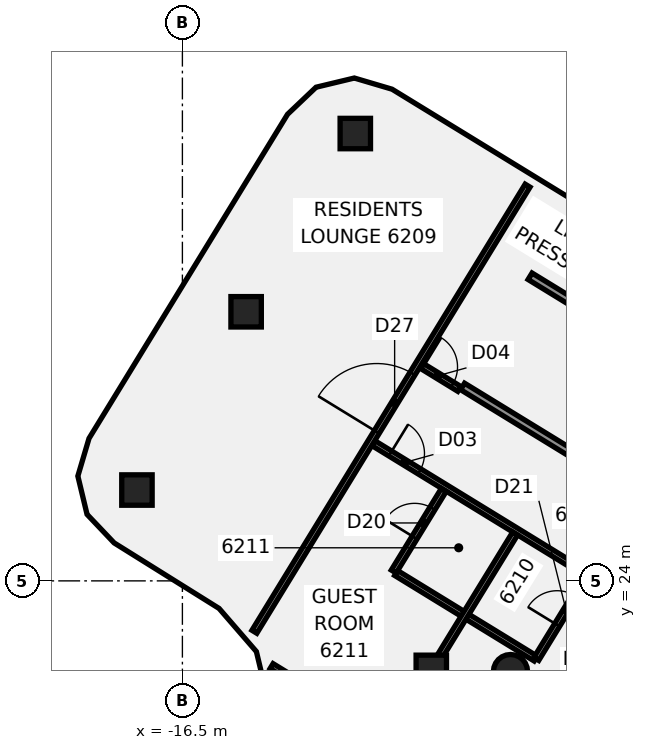
"""IFC4 building model, lengths in metres.
Left out: names, types, materials, properties, quantities, classifications, styles, units other than length and angle.
Written with IfcOpenShell. Run it as: python <this file> out.ifc"""

import sys

from ifc_helpers import new_model, si_unit, direction, frame, frame_2d, origin, origin_2d, place, context, subcontext, project, spatial, polyline, rectangle, circle, outline, extrude, element, fill, save


model = new_model("IFC4")
c1 = context("Model", 3, precision=1e-05, world=origin(), true_north=direction((0.0, 1.0)))
c2 = subcontext(c1, "Body", "Model", "MODEL_VIEW")
j1 = project(units=[si_unit("LENGTHUNIT", "METRE"), si_unit("PLANEANGLEUNIT", "RADIAN")], contexts=[c1])
p1 = place(None, origin())
s1 = spatial("IfcSite", under=j1, at=p1, CompositionType="ELEMENT")
p2 = place(p1, origin())
s2 = spatial("IfcBuilding", under=s1, at=p2, CompositionType="ELEMENT")
p3 = place(p2, frame((0.0, 0.0, 245.1)))
s3 = spatial("IfcBuildingStorey", under=s2, at=p3, CompositionType="ELEMENT", Elevation=245.1)
p4 = place(p3, frame((-7.866, 21.613, -0.14), z_axis=(0.0, 0.0, 1.0), x_axis=(1.0, 0.0, 0.0)))
e1 = element("IfcColumn", 1, at=p4, inside=s3, PredefinedType="COLUMN", context=c2, shape_type="SweptSolid", body=[
    extrude(circle(Radius=0.45, at=origin_2d()), origin(), (0.0, 0.0, 1.0), 3.6),
])
p5 = place(p3, frame((-9.951, 21.646, -0.139), z_axis=(0.002304349187, -0.050289032263, 0.998732047753), x_axis=(0.521494023038, 0.852234898638, 0.041709249322)))
e2 = element("IfcColumn", 2, at=p5, inside=s3, PredefinedType="COLUMN", context=c2, shape_type="SweptSolid", body=[
    extrude(rectangle(XDim=0.8, YDim=0.8, at=origin_2d()), origin(), (0.0, 0.0, 1.0), 3.602),
])
p6 = place(p3, frame((-11.95, 35.77, -0.138), z_axis=(0.016732272365, -0.110986242097, 0.993681078177), x_axis=(0.522723880647, 0.84816015737, 0.085930739847)))
e3 = element("IfcColumn", 3, at=p6, inside=s3, PredefinedType="COLUMN", context=c2, shape_type="SweptSolid", body=[
    extrude(rectangle(XDim=0.8, YDim=0.8, at=origin_2d()), origin(), (0.0, 0.0, 1.0), 3.619),
])
p7 = place(p3, frame((-14.823, 31.08, -0.138), z_axis=(0.040318536975, -0.124994195598, 0.991337917485), x_axis=(0.524239786141, 0.84726684636, 0.085507529997)))
e4 = element("IfcColumn", 4, at=p7, inside=s3, PredefinedType="COLUMN", context=c2, shape_type="SweptSolid", body=[
    extrude(rectangle(XDim=0.8, YDim=0.8, at=origin_2d()), origin(), (0.0, 0.0, 1.0), 3.627),
])
p8 = place(p3, frame((-17.696, 26.39, -0.138), z_axis=(0.063818113433, -0.138708770206, 0.988274822843), x_axis=(0.525000356657, 0.846851158374, 0.084957289684)))
e5 = element("IfcColumn", 5, at=p8, inside=s3, PredefinedType="COLUMN", context=c2, shape_type="SweptSolid", body=[
    extrude(rectangle(XDim=0.8, YDim=0.8, at=origin_2d()), origin(), (0.0, 0.0, 1.0), 3.638),
])
p9 = place(p3, frame((-14.153, 21.758, 0.0), z_axis=(0.0, 0.0, 1.0), x_axis=(0.852608746258, -0.522549830929, 0.0)))
e6 = element("IfcWall", 6, at=p9, inside=s3, PredefinedType="PARTITIONING", context=c2, shape_type="SweptSolid", body=[
    extrude(rectangle(XDim=2.809, YDim=0.15, at=frame_2d((1.405, 0.0))), origin(), (0.0, 0.0, 1.0), 2.864),
])
p10 = place(p3, frame((-10.875, 24.206, 0.0), z_axis=(0.0, 0.0, 1.0), x_axis=(0.852560498392, -0.522628545509, 0.0)))
e7 = element("IfcWall", 7, at=p10, inside=s3, PredefinedType="PARTITIONING", context=c2, shape_type="SweptSolid", body=[
    extrude(rectangle(XDim=4.305, YDim=0.15, at=frame_2d((2.153, 0.0))), origin(), (0.0, 0.0, 1.0), 2.864),
])
p11 = place(p3, frame((-11.473, 27.622, 0.0), z_axis=(0.0, 0.0, 1.0), x_axis=(0.852562421737, -0.522625407957, 0.0)))
e8 = element("IfcWall", 8, at=p11, inside=s3, PredefinedType="PARTITIONING", context=c2, shape_type="SweptSolid", body=[
    extrude(rectangle(XDim=8.675, YDim=0.15, at=frame_2d((4.338, 0.0))), origin(), (0.0, 0.0, 1.0), 2.864),
])
p12 = place(p11, frame((6.921, 0.0, 0.0)))
e9 = element("IfcOpeningElement", 9, at=p12, cuts=e8, PredefinedType="OPENING", context=c2, shape_type="SweptSolid", body=[
    extrude(rectangle(XDim=0.9, YDim=2.1, at=frame_2d((0.45, 1.05))), frame((0.0, 0.085, 0.0), z_axis=(0.0, -1.0, 0.0), x_axis=(1.0, 0.0, 0.0)), (0.0, 0.0, 1.0), 0.17),
])
p13 = place(p11, frame((0.52, 0.0, 0.0)))
e10 = element("IfcOpeningElement", 10, at=p13, cuts=e8, PredefinedType="OPENING", context=c2, shape_type="SweptSolid", body=[
    extrude(rectangle(XDim=0.9, YDim=2.1, at=frame_2d((0.45, 1.05))), frame((0.0, 0.085, 0.0), z_axis=(0.0, -1.0, 0.0), x_axis=(1.0, 0.0, 0.0)), (0.0, 0.0, 1.0), 0.17),
])
p14 = place(p3, frame((-10.22, 29.668, 0.0), z_axis=(0.0, 0.0, 1.0), x_axis=(0.852431711589, -0.522838576501, 0.0)))
e11 = element("IfcWall", 11, at=p14, inside=s3, PredefinedType="PARTITIONING", context=c2, shape_type="SweptSolid", body=[
    extrude(rectangle(XDim=1.18, YDim=0.15, at=frame_2d((0.59, 0.0))), origin(), (0.0, 0.0, 1.0), 2.864),
])
p15 = place(p14, frame((0.07, 0.0, 0.0)))
e12 = element("IfcOpeningElement", 12, at=p15, cuts=e11, PredefinedType="OPENING", context=c2, shape_type="SweptSolid", body=[
    extrude(rectangle(XDim=0.9, YDim=2.1, at=frame_2d((0.45, 1.05))), frame((0.0, 0.085, 0.0), z_axis=(0.0, -1.0, 0.0), x_axis=(1.0, 0.0, 0.0)), (0.0, 0.0, 1.0), 0.17),
])
p16 = place(p3, frame((-10.939, 24.245, 0.0), z_axis=(0.0, 0.0, 1.0), x_axis=(0.522621117444, 0.85256505183, 0.0)))
e13 = element("IfcWall", 13, at=p16, inside=s3, PredefinedType="PARTITIONING", context=c2, shape_type="SweptSolid", body=[
    extrude(rectangle(XDim=2.52, YDim=0.15, at=frame_2d((1.26, 0.0))), origin(), (0.0, 0.0, 1.0), 2.864),
])
p17 = place(p16, frame((1.05, 0.0, 0.0)))
e14 = element("IfcOpeningElement", 14, at=p17, cuts=e13, PredefinedType="OPENING", context=c2, shape_type="SweptSolid", body=[
    extrude(rectangle(XDim=0.9, YDim=2.1, at=frame_2d((0.45, 1.05))), frame((0.0, 0.085, 0.0), z_axis=(0.0, -1.0, 0.0), x_axis=(1.0, 0.0, 0.0)), (0.0, 0.0, 1.0), 0.17),
])
p18 = place(p3, frame((-9.74, 21.99, 0.0), z_axis=(0.0, 0.0, 1.0), x_axis=(0.522590556225, 0.852583785058, 0.0)))
e15 = element("IfcWall", 15, at=p18, inside=s3, PredefinedType="PARTITIONING", context=c2, shape_type="SweptSolid", body=[
    extrude(rectangle(XDim=3.817, YDim=0.15, at=frame_2d((1.908, 0.0))), origin(), (0.0, 0.0, 1.0), 2.864),
])
p19 = place(p3, frame((-7.187, 21.946, 0.0), z_axis=(0.0, 0.0, 1.0), x_axis=(0.522621117444, 0.85256505183, 0.0)))
e16 = element("IfcWall", 16, at=p19, inside=s3, PredefinedType="PARTITIONING", context=c2, shape_type="SweptSolid", body=[
    extrude(rectangle(XDim=2.52, YDim=0.15, at=frame_2d((1.26, 0.0))), origin(), (0.0, 0.0, 1.0), 2.864),
])
p20 = place(p19, frame((1.05, 0.0, 0.0)))
e17 = element("IfcOpeningElement", 17, at=p20, cuts=e16, PredefinedType="OPENING", context=c2, shape_type="SweptSolid", body=[
    extrude(rectangle(XDim=0.9, YDim=2.1, at=frame_2d((0.45, 1.05))), frame((0.0, 0.085, 0.0), z_axis=(0.0, -1.0, 0.0), x_axis=(1.0, 0.0, 0.0)), (0.0, 0.0, 1.0), 0.17),
])
p21 = place(p3, frame((-7.17, 17.573, 0.0), z_axis=(0.0, 0.0, 1.0), x_axis=(0.522586882087, 0.852586037107, 0.0)))
e18 = element("IfcWall", 18, at=p21, inside=s3, PredefinedType="PARTITIONING", context=c2, shape_type="SweptSolid", body=[
    extrude(rectangle(XDim=5.765, YDim=0.15, at=frame_2d((2.883, 0.0))), origin(), (0.0, 0.0, 1.0), 2.864),
])
p22 = place(p3, frame((-14.606, 22.661, 0.0), z_axis=(0.0, 0.0, 1.0), x_axis=(0.522270484335, 0.852779890237, 0.0)))
e19 = element("IfcWall", 19, at=p22, inside=s3, PredefinedType="PARTITIONING", context=c2, shape_type="SweptSolid", body=[
    extrude(rectangle(XDim=13.765, YDim=0.15, at=frame_2d((6.883, 0.0))), origin(), (0.0, 0.0, 1.0), 2.864),
])
p23 = place(p22, frame((6.166, 0.0, 0.0)))
e20 = element("IfcOpeningElement", 20, at=p23, cuts=e19, PredefinedType="OPENING", context=c2, shape_type="SweptSolid", body=[
    extrude(rectangle(XDim=1.8, YDim=2.1, at=frame_2d((0.9, 1.05))), frame((0.0, 0.085, 0.0), z_axis=(0.0, -1.0, 0.0), x_axis=(1.0, 0.0, 0.0)), (0.0, 0.0, 1.0), 0.17),
])
p24 = place(p3, frame((-3.414, 25.616, -0.14), z_axis=(0.0, 0.0, 1.0), x_axis=(-0.852723778583, 0.522362094183, 0.0)))
e21 = element("IfcWall", 21, at=p24, inside=s3, PredefinedType="SHEAR", context=c2, shape_type="SweptSolid", body=[
    extrude(rectangle(XDim=6.7, YDim=0.2, at=frame_2d((3.35, 0.0))), origin(), (0.0, 0.0, 1.0), 3.004),
])
p25 = place(p24, frame((0.35, 0.0, 0.0)))
e22 = element("IfcOpeningElement", 22, at=p25, cuts=e21, PredefinedType="OPENING", context=c2, shape_type="SweptSolid", body=[
    extrude(rectangle(XDim=1.0, YDim=2.1, at=frame_2d((0.5, 1.05))), frame((0.0, 0.11, 0.0), z_axis=(0.0, -1.0, 0.0), x_axis=(1.0, 0.0, 0.0)), (0.0, 0.0, 1.0), 0.22),
])
p26 = place(p3, frame((-1.638, 28.515, -0.14), z_axis=(0.0, 0.0, 1.0), x_axis=(-0.852733721115, 0.522345863268, 0.0)))
e23 = element("IfcWall", 23, at=p26, inside=s3, PredefinedType="SHEAR", context=c2, shape_type="SweptSolid", body=[
    extrude(rectangle(XDim=6.7, YDim=0.2, at=frame_2d((3.35, 0.0))), origin(), (0.0, 0.0, 1.0), 3.004),
])
p27 = place(p3, frame((0.0, 0.0, -0.14)))
e24 = element("IfcWall", 24, at=p27, inside=s3, PredefinedType="SHEAR", context=c2, shape_type="SweptSolid", body=[
    extrude(outline(polyline([(-7.233, 31.825), (-7.403, 31.93), (-9.075, 29.201), (-8.904, 29.097), (-7.233, 31.825)])), origin(), (0.0, 0.0, 1.0), 3.004),
])
p28 = place(p13, frame((0.9, 0.0, 0.0), z_axis=(0.0, 0.0, 1.0), x_axis=(-1.0, 0.0, 0.0)))
e25 = element("IfcDoor", 25, at=p28, inside=s3, OperationType="SINGLE_SWING_LEFT", PredefinedType="DOOR", context=c2, shape_type="SweptSolid", body=[
    extrude(rectangle(XDim=0.9, YDim=2.1, at=frame_2d((0.45, 1.05))), frame((0.0, 0.025, 0.0), z_axis=(0.0, -1.0, 0.0), x_axis=(1.0, 0.0, 0.0)), (0.0, 0.0, 1.0), 0.05),
])
fill(e10, e25)
p29 = place(p15, origin())
e26 = element("IfcDoor", 26, at=p29, inside=s3, OperationType="SINGLE_SWING_RIGHT", PredefinedType="DOOR", context=c2, shape_type="SweptSolid", body=[
    extrude(rectangle(XDim=0.9, YDim=2.1, at=frame_2d((0.45, 1.05))), frame((0.0, 0.025, 0.0), z_axis=(0.0, -1.0, 0.0), x_axis=(1.0, 0.0, 0.0)), (0.0, 0.0, 1.0), 0.05),
])
fill(e12, e26)
p30 = place(p17, frame((0.9, 0.0, 0.0), z_axis=(0.0, 0.0, 1.0), x_axis=(-1.0, 0.0, 0.0)))
e27 = element("IfcDoor", 27, at=p30, inside=s3, OperationType="SINGLE_SWING_RIGHT", PredefinedType="DOOR", context=c2, shape_type="SweptSolid", body=[
    extrude(rectangle(XDim=0.9, YDim=2.1, at=frame_2d((0.45, 1.05))), frame((0.0, 0.025, 0.0), z_axis=(0.0, -1.0, 0.0), x_axis=(1.0, 0.0, 0.0)), (0.0, 0.0, 1.0), 0.05),
])
fill(e14, e27)
p31 = place(p20, origin())
e28 = element("IfcDoor", 28, at=p31, inside=s3, OperationType="SINGLE_SWING_LEFT", PredefinedType="DOOR", context=c2, shape_type="SweptSolid", body=[
    extrude(rectangle(XDim=0.9, YDim=2.1, at=frame_2d((0.45, 1.05))), frame((0.0, 0.025, 0.0), z_axis=(0.0, -1.0, 0.0), x_axis=(1.0, 0.0, 0.0)), (0.0, 0.0, 1.0), 0.05),
])
fill(e17, e28)
p32 = place(p23, origin())
e29 = element("IfcDoor", 29, at=p32, inside=s3, OperationType="DOUBLE_DOOR_SINGLE_SWING", PredefinedType="DOOR", context=c2, shape_type="SweptSolid", body=[
    extrude(rectangle(XDim=1.8, YDim=2.1, at=frame_2d((0.9, 1.05))), frame((0.0, 0.025, 0.0), z_axis=(0.0, -1.0, 0.0), x_axis=(1.0, 0.0, 0.0)), (0.0, 0.0, 1.0), 0.05),
])
fill(e20, e29)
save(model, sys.argv[1])
